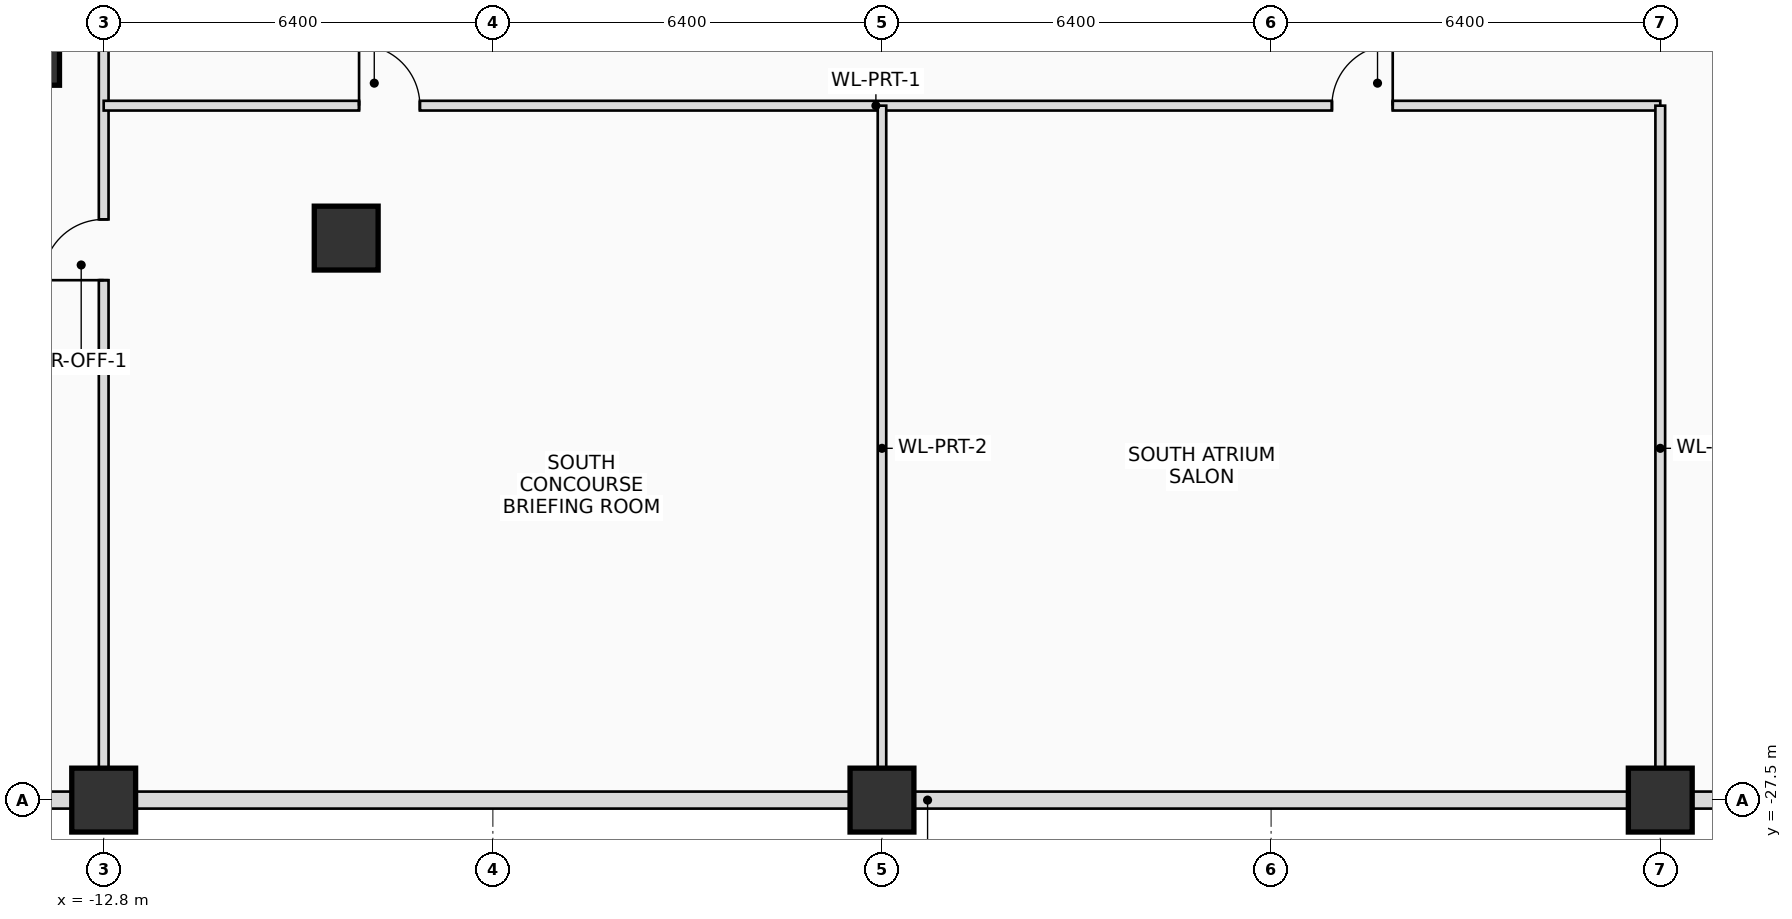
"""IFC4 building model, lengths in metres.
Left out: names, types, materials, properties, quantities, classifications, styles, units other than length and angle.
Written with IfcOpenShell. Run it as: python <this file> out.ifc"""

import sys

from ifc_helpers import new_model, si_unit, direction, frame, frame_2d, origin, origin_2d, place, context, subcontext, project, spatial, rectangle, extrude, source, transform, mapped, element, fill, save


model = new_model("IFC4")
c1 = context("Model", 3, precision=1e-05, world=origin(), true_north=direction((0.0, 1.0)))
c2 = subcontext(c1, "Body", "Model", "MODEL_VIEW")
j1 = project(units=[si_unit("LENGTHUNIT", "METRE"), si_unit("PLANEANGLEUNIT", "RADIAN")], contexts=[c1])
p1 = place(None, origin())
s1 = spatial("IfcSite", under=j1, at=p1, CompositionType="ELEMENT")
p2 = place(p1, origin())
s2 = spatial("IfcBuilding", under=s1, at=p2, CompositionType="ELEMENT")
p3 = place(p2, frame((0.0, 0.0, 16.2)))
s3 = spatial("IfcBuildingStorey", under=s2, at=p3, CompositionType="ELEMENT", Elevation=16.2)
m1 = source(origin(), c2, "Body", "SweptSolid", [
    extrude(rectangle(XDim=1.05, YDim=1.05, at=origin_2d()), origin(), (0.0, 0.0, 1.0), 3.58),
])
for number, where, z_axis, x_axis in (
    (1, (-12.8, -27.5, 0.0), (0.0, 0.0, 1.0), (1.0, 0.0, 0.0)),
    (2, (0.0, -27.5, 0.0), (0.0, 0.0, 1.0), (1.0, 0.0, 0.0)),
    (3, (12.8, -27.5, 0.0), (0.0, 0.0, 1.0), (1.0, 0.0, 0.0)),
    (4, (-8.812, -18.258, 0.0), (0.0, 0.0, 1.0), (1.0, 0.0, 0.0)),
    (5, (-14.052, -15.219, 0.0), (0.0, 0.0, 1.0), (1.0, 0.0, 0.0)),
):
    element("IfcColumn", number, at=place(p3, frame(where, z_axis=z_axis, x_axis=x_axis)), inside=s3, PredefinedType="COLUMN", context=c2, shape_type="MappedRepresentation", body=[
        mapped(m1, transform((0.0, 0.0, 0.0), scale=1.0)),
    ])
p4 = place(p3, frame((34.0, -27.5, 0.0), z_axis=(0.0, 0.0, 1.0), x_axis=(-1.0, 0.0, 0.0)))
e6 = element("IfcWall", 6, at=p4, inside=s3, PredefinedType="SOLIDWALL", context=c2, shape_type="SweptSolid", body=[
    extrude(rectangle(XDim=68.0, YDim=0.28, at=frame_2d((34.0, 0.0))), origin(), (0.0, 0.0, 1.0), 2.64),
])
p5 = place(p4, frame((16.0, 0.0, 0.65)))
e7 = element("IfcOpeningElement", 7, at=p5, cuts=e6, PredefinedType="OPENING", context=c2, shape_type="SweptSolid", body=[
    extrude(rectangle(XDim=1.5, YDim=1.8, at=frame_2d((0.75, 0.9))), frame((0.0, 0.15, 0.0), z_axis=(0.0, -1.0, 0.0), x_axis=(1.0, 0.0, 0.0)), (0.0, 0.0, 1.0), 0.3),
])
p6 = place(p4, frame((49.0, 0.0, 0.65)))
e8 = element("IfcOpeningElement", 8, at=p6, cuts=e6, PredefinedType="OPENING", context=c2, shape_type="SweptSolid", body=[
    extrude(rectangle(XDim=1.5, YDim=1.8, at=frame_2d((0.75, 0.9))), frame((0.0, 0.15, 0.0), z_axis=(0.0, -1.0, 0.0), x_axis=(1.0, 0.0, 0.0)), (0.0, 0.0, 1.0), 0.3),
])
p7 = place(p3, frame((-12.8, -27.35, 0.0), z_axis=(0.0, 0.0, 1.0), x_axis=(0.0, 1.0, 0.0)))
e9 = element("IfcWall", 9, at=p7, inside=s3, PredefinedType="PARTITIONING", context=c2, shape_type="SweptSolid", body=[
    extrude(rectangle(XDim=41.35, YDim=0.16, at=frame_2d((20.675, 0.0))), origin(), (0.0, 0.0, 1.0), 3.015),
])
p8 = place(p7, frame((8.4, 0.0, 0.0)))
e10 = element("IfcOpeningElement", 10, at=p8, cuts=e9, PredefinedType="OPENING", context=c2, shape_type="SweptSolid", body=[
    extrude(rectangle(XDim=1.0, YDim=2.25, at=frame_2d((0.5, 1.125))), frame((0.0, 0.09, 0.0), z_axis=(0.0, -1.0, 0.0), x_axis=(1.0, 0.0, 0.0)), (0.0, 0.0, 1.0), 0.18),
])
p9 = place(p3, frame((-12.8, -16.08, 0.0), z_axis=(0.0, 0.0, 1.0), x_axis=(1.0, 0.0, 0.0)))
e11 = element("IfcWall", 11, at=p9, inside=s3, PredefinedType="PARTITIONING", context=c2, shape_type="SweptSolid", body=[
    extrude(rectangle(XDim=25.6, YDim=0.16, at=frame_2d((12.8, 0.0))), origin(), (0.0, 0.0, 1.0), 3.015),
])
p10 = place(p9, frame((4.2, 0.0, 0.0)))
e12 = element("IfcOpeningElement", 12, at=p10, cuts=e11, PredefinedType="OPENING", context=c2, shape_type="SweptSolid", body=[
    extrude(rectangle(XDim=1.0, YDim=2.25, at=frame_2d((0.5, 1.125))), frame((0.0, 0.09, 0.0), z_axis=(0.0, -1.0, 0.0), x_axis=(1.0, 0.0, 0.0)), (0.0, 0.0, 1.0), 0.18),
])
p11 = place(p9, frame((20.2, 0.0, 0.0)))
e13 = element("IfcOpeningElement", 13, at=p11, cuts=e11, PredefinedType="OPENING", context=c2, shape_type="SweptSolid", body=[
    extrude(rectangle(XDim=1.0, YDim=2.25, at=frame_2d((0.5, 1.125))), frame((0.0, 0.09, 0.0), z_axis=(0.0, -1.0, 0.0), x_axis=(1.0, 0.0, 0.0)), (0.0, 0.0, 1.0), 0.18),
])
p12 = place(p3, frame((12.8, -27.35, 0.0), z_axis=(0.0, 0.0, 1.0), x_axis=(0.0, 1.0, 0.0)))
e14 = element("IfcWall", 14, at=p12, inside=s3, PredefinedType="PARTITIONING", context=c2, shape_type="SweptSolid", body=[
    extrude(rectangle(XDim=11.27, YDim=0.16, at=frame_2d((5.635, 0.0))), origin(), (0.0, 0.0, 1.0), 3.015),
])
p13 = place(p3, frame((0.0, -27.35, 0.0), z_axis=(0.0, 0.0, 1.0), x_axis=(0.0, 1.0, 0.0)))
e15 = element("IfcWall", 15, at=p13, inside=s3, PredefinedType="PARTITIONING", context=c2, shape_type="SweptSolid", body=[
    extrude(rectangle(XDim=11.27, YDim=0.14, at=frame_2d((5.635, 0.0))), origin(), (0.0, 0.0, 1.0), 3.56),
])
p14 = place(p8, origin())
e16 = element("IfcDoor", 16, at=p14, inside=s3, OperationType="SINGLE_SWING_LEFT", PredefinedType="DOOR", context=c2, shape_type="SweptSolid", body=[
    extrude(rectangle(XDim=1.0, YDim=2.25, at=frame_2d((0.5, 1.125))), frame((0.0, 0.025, 0.0), z_axis=(0.0, -1.0, 0.0), x_axis=(1.0, 0.0, 0.0)), (0.0, 0.0, 1.0), 0.05),
])
fill(e10, e16)
p15 = place(p10, origin())
e17 = element("IfcDoor", 17, at=p15, inside=s3, OperationType="SINGLE_SWING_LEFT", PredefinedType="DOOR", context=c2, shape_type="SweptSolid", body=[
    extrude(rectangle(XDim=1.0, YDim=2.25, at=frame_2d((0.5, 1.125))), frame((0.0, 0.025, 0.0), z_axis=(0.0, -1.0, 0.0), x_axis=(1.0, 0.0, 0.0)), (0.0, 0.0, 1.0), 0.05),
])
fill(e12, e17)
p16 = place(p11, origin())
e18 = element("IfcDoor", 18, at=p16, inside=s3, OperationType="SINGLE_SWING_RIGHT", PredefinedType="DOOR", context=c2, shape_type="SweptSolid", body=[
    extrude(rectangle(XDim=1.0, YDim=2.25, at=frame_2d((0.5, 1.125))), frame((0.0, 0.025, 0.0), z_axis=(0.0, -1.0, 0.0), x_axis=(1.0, 0.0, 0.0)), (0.0, 0.0, 1.0), 0.05),
])
fill(e13, e18)
save(model, sys.argv[1])
